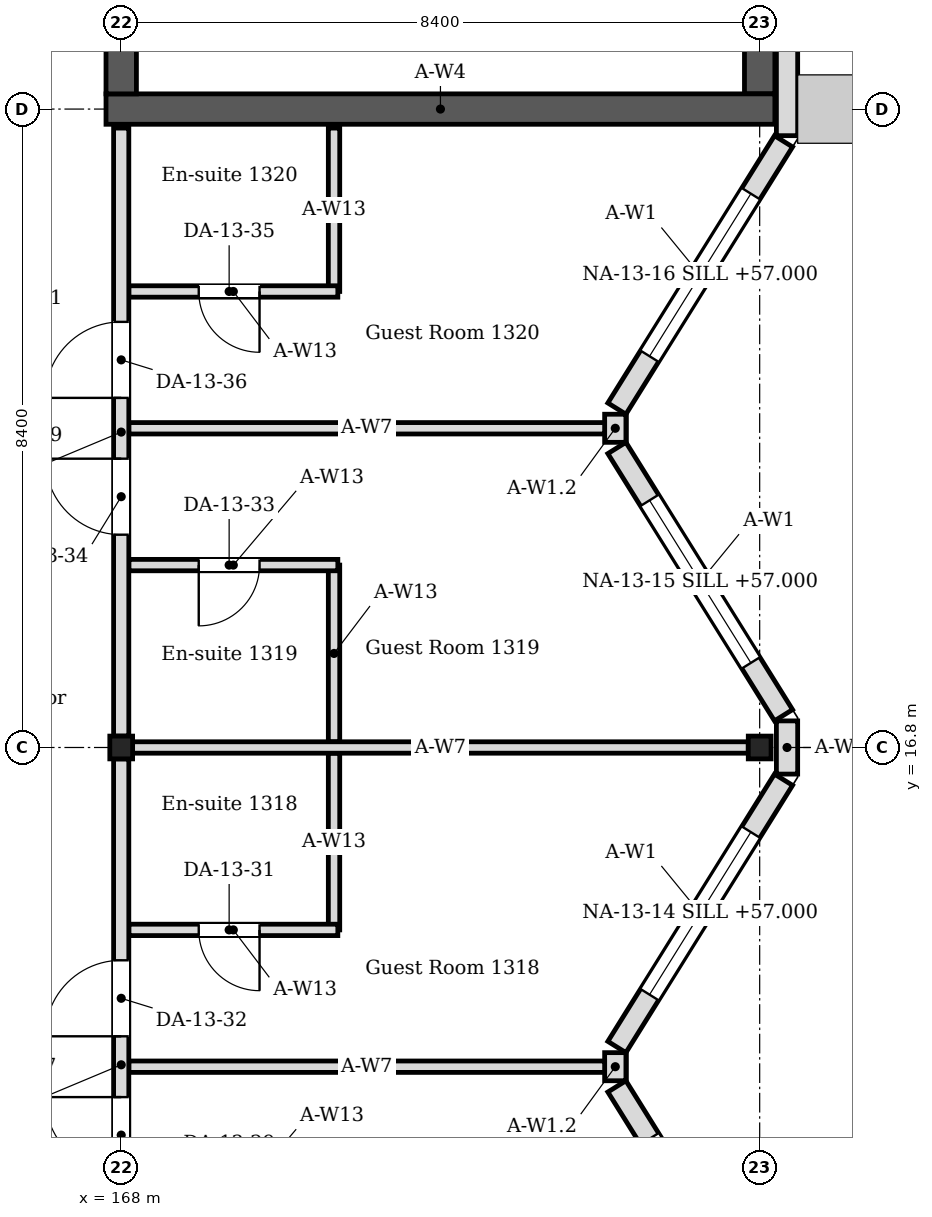
"""IFC4 building model, lengths in metres.
Left out: names, types, materials, properties, quantities, classifications, styles, units other than length and angle.
Written with IfcOpenShell. Run it as: python <this file> out.ifc"""

import sys

from ifc_helpers import new_model, si_unit, direction, frame, frame_2d, origin, origin_2d, place, context, subcontext, project, spatial, rectangle, i_section, extrude, element, fill, save


model = new_model("IFC4")
c1 = context("Model", 3, precision=1e-05, world=origin(), true_north=direction((0.0, 1.0)))
c2 = subcontext(c1, "Body", "Model", "MODEL_VIEW")
j1 = project(units=[si_unit("LENGTHUNIT", "METRE"), si_unit("PLANEANGLEUNIT", "RADIAN")], contexts=[c1])
p1 = place(None, origin())
s1 = spatial("IfcSite", under=j1, at=p1, CompositionType="ELEMENT")
p2 = place(p1, origin())
s2 = spatial("IfcBuilding", under=s1, at=p2, CompositionType="ELEMENT")
p3 = place(p2, frame((0.0, 0.0, 56.4)))
s3 = spatial("IfcBuildingStorey", under=s2, at=p3, CompositionType="ELEMENT", Elevation=56.4)
for number, where, z_axis, x_axis in (
    (1, (168.0, 16.8, 0.0), (0.0, 0.0, 1.0), (1.0, 0.0, 0.0)),
    (2, (176.4, 16.8, 0.0), (0.0, 0.0, 1.0), (1.0, 0.0, 0.0)),
):
    element("IfcColumn", number, at=place(p3, frame(where, z_axis=z_axis, x_axis=x_axis)), inside=s3, PredefinedType="COLUMN", context=c2, shape_type="SweptSolid", body=[
        extrude(i_section(OverallWidth=0.3, OverallDepth=0.3, WebThickness=0.01, FlangeThickness=0.015, FilletRadius=0.013, at=origin_2d()), origin(), (0.0, 0.0, 1.0), 4.2),
    ])
p4 = place(p3, frame((167.8, 25.2, 0.0), z_axis=(0.0, 0.0, 1.0), x_axis=(1.0, 0.0, 0.0)))
e3 = element("IfcWall", 3, at=p4, inside=s3, PredefinedType="SOLIDWALL", context=c2, shape_type="SweptSolid", body=[
    extrude(rectangle(XDim=8.8, YDim=0.4, at=frame_2d((4.4, 0.0))), origin(), (0.0, 0.0, 1.0), 4.05),
])
p5 = place(p3, frame((168.0, 25.4, 0.0), z_axis=(0.0, 0.0, 1.0), x_axis=(0.0, 1.0, 0.0)))
e4 = element("IfcWall", 4, at=p5, inside=s3, PredefinedType="SOLIDWALL", context=c2, shape_type="SweptSolid", body=[
    extrude(rectangle(XDim=16.4, YDim=0.4, at=frame_2d((8.2, 0.0))), origin(), (0.0, 0.0, 1.0), 4.05),
])
p6 = place(p5, frame((1.0, 0.0, 0.0)))
e5 = element("IfcOpeningElement", 5, at=p6, cuts=e4, PredefinedType="OPENING", context=c2, shape_type="SweptSolid", body=[
    extrude(rectangle(XDim=1.0, YDim=2.1, at=frame_2d((0.5, 1.05))), frame((0.0, 0.21, 0.0), z_axis=(0.0, -1.0, 0.0), x_axis=(1.0, 0.0, 0.0)), (0.0, 0.0, 1.0), 0.42),
])
p7 = place(p5, frame((14.4, 0.0, 0.0)))
e6 = element("IfcOpeningElement", 6, at=p7, cuts=e4, PredefinedType="OPENING", context=c2, shape_type="SweptSolid", body=[
    extrude(rectangle(XDim=1.4, YDim=2.1, at=frame_2d((0.7, 1.05))), frame((0.0, 0.21, 0.0), z_axis=(0.0, -1.0, 0.0), x_axis=(1.0, 0.0, 0.0)), (0.0, 0.0, 1.0), 0.42),
])
p8 = place(p3, frame((176.4, 25.4, 0.0), z_axis=(0.0, 0.0, 1.0), x_axis=(0.0, 1.0, 0.0)))
e7 = element("IfcWall", 7, at=p8, inside=s3, PredefinedType="SOLIDWALL", context=c2, shape_type="SweptSolid", body=[
    extrude(rectangle(XDim=16.4, YDim=0.4, at=frame_2d((8.2, 0.0))), origin(), (0.0, 0.0, 1.0), 4.05),
])
p9 = place(p3, frame((176.714, 8.824, 0.0), z_axis=(0.0, 0.0, 1.0), x_axis=(-0.529018946142, 0.848610013271, 0.0)))
e8 = element("IfcWall", 8, at=p9, inside=s3, PredefinedType="SOLIDWALL", context=c2, shape_type="SweptSolid", body=[
    extrude(rectangle(XDim=4.144, YDim=0.28, at=frame_2d((2.072, 0.0))), origin(), (0.0, 0.0, 1.0), 4.05),
])
p10 = place(p9, frame((0.812, 0.0, 0.6)))
e9 = element("IfcOpeningElement", 9, at=p10, cuts=e8, PredefinedType="OPENING", context=c2, shape_type="SweptSolid", body=[
    extrude(rectangle(XDim=2.52, YDim=2.4, at=frame_2d((1.26, 1.2))), frame((0.0, 0.15, 0.0), z_axis=(0.0, -1.0, 0.0), x_axis=(1.0, 0.0, 0.0)), (0.0, 0.0, 1.0), 0.3),
])
p11 = place(p3, frame((174.521, 12.859, 0.0), z_axis=(0.0, 0.0, 1.0), x_axis=(0.528992500338, 0.848626498871, 0.0)))
e10 = element("IfcWall", 10, at=p11, inside=s3, PredefinedType="SOLIDWALL", context=c2, shape_type="SweptSolid", body=[
    extrude(rectangle(XDim=4.145, YDim=0.28, at=frame_2d((2.072, 0.0))), origin(), (0.0, 0.0, 1.0), 4.05),
])
p12 = place(p11, frame((0.812, 0.0, 0.6)))
e11 = element("IfcOpeningElement", 11, at=p12, cuts=e10, PredefinedType="OPENING", context=c2, shape_type="SweptSolid", body=[
    extrude(rectangle(XDim=2.52, YDim=2.4, at=frame_2d((1.26, 1.2))), frame((0.0, 0.15, 0.0), z_axis=(0.0, -1.0, 0.0), x_axis=(1.0, 0.0, 0.0)), (0.0, 0.0, 1.0), 0.3),
])
p13 = place(p3, frame((174.5, 12.415, 0.0), z_axis=(0.0, 0.0, 1.0), x_axis=(0.0, 1.0, 0.0)))
e12 = element("IfcWall", 12, at=p13, inside=s3, PredefinedType="SOLIDWALL", context=c2, shape_type="SweptSolid", body=[
    extrude(rectangle(XDim=0.37, YDim=0.28, at=frame_2d((0.185, 0.0))), origin(), (0.0, 0.0, 1.0), 3.604),
])
p14 = place(p3, frame((176.76, 16.45, 0.0), z_axis=(0.0, 0.0, 1.0), x_axis=(0.0, 1.0, 0.0)))
e13 = element("IfcWall", 13, at=p14, inside=s3, PredefinedType="SOLIDWALL", context=c2, shape_type="SweptSolid", body=[
    extrude(rectangle(XDim=0.7, YDim=0.28, at=frame_2d((0.35, 0.0))), origin(), (0.0, 0.0, 1.0), 4.05),
])
p15 = place(p3, frame((176.714, 17.224, 0.0), z_axis=(0.0, 0.0, 1.0), x_axis=(-0.529018946142, 0.848610013271, 0.0)))
e14 = element("IfcWall", 14, at=p15, inside=s3, PredefinedType="SOLIDWALL", context=c2, shape_type="SweptSolid", body=[
    extrude(rectangle(XDim=4.144, YDim=0.28, at=frame_2d((2.072, 0.0))), origin(), (0.0, 0.0, 1.0), 4.05),
])
p16 = place(p15, frame((0.812, 0.0, 0.6)))
e15 = element("IfcOpeningElement", 15, at=p16, cuts=e14, PredefinedType="OPENING", context=c2, shape_type="SweptSolid", body=[
    extrude(rectangle(XDim=2.52, YDim=2.4, at=frame_2d((1.26, 1.2))), frame((0.0, 0.15, 0.0), z_axis=(0.0, -1.0, 0.0), x_axis=(1.0, 0.0, 0.0)), (0.0, 0.0, 1.0), 0.3),
])
p17 = place(p3, frame((174.521, 21.259, 0.0), z_axis=(0.0, 0.0, 1.0), x_axis=(0.529018946142, 0.848610013271, 0.0)))
e16 = element("IfcWall", 16, at=p17, inside=s3, PredefinedType="SOLIDWALL", context=c2, shape_type="SweptSolid", body=[
    extrude(rectangle(XDim=4.144, YDim=0.28, at=frame_2d((2.072, 0.0))), origin(), (0.0, 0.0, 1.0), 4.05),
])
p18 = place(p17, frame((0.812, 0.0, 0.6)))
e17 = element("IfcOpeningElement", 17, at=p18, cuts=e16, PredefinedType="OPENING", context=c2, shape_type="SweptSolid", body=[
    extrude(rectangle(XDim=2.52, YDim=2.4, at=frame_2d((1.26, 1.2))), frame((0.0, 0.15, 0.0), z_axis=(0.0, -1.0, 0.0), x_axis=(1.0, 0.0, 0.0)), (0.0, 0.0, 1.0), 0.3),
])
p19 = place(p3, frame((174.5, 20.815, 0.0), z_axis=(0.0, 0.0, 1.0), x_axis=(0.0, 1.0, 0.0)))
e18 = element("IfcWall", 18, at=p19, inside=s3, PredefinedType="SOLIDWALL", context=c2, shape_type="SweptSolid", body=[
    extrude(rectangle(XDim=0.37, YDim=0.28, at=frame_2d((0.185, 0.0))), origin(), (0.0, 0.0, 1.0), 3.604),
])
p20 = place(p3, frame((176.76, 24.85, 0.0), z_axis=(0.0, 0.0, 1.0), x_axis=(0.0, 1.0, 0.0)))
e19 = element("IfcWall", 19, at=p20, inside=s3, PredefinedType="SOLIDWALL", context=c2, shape_type="SweptSolid", body=[
    extrude(rectangle(XDim=42.57, YDim=0.28, at=frame_2d((21.285, 0.0))), origin(), (0.0, 0.0, 1.0), 4.05),
])
p21 = place(p20, frame((18.83, 0.0, 0.6)))
e20 = element("IfcOpeningElement", 20, at=p21, cuts=e19, PredefinedType="OPENING", context=c2, shape_type="SweptSolid", body=[
    extrude(rectangle(XDim=5.04, YDim=2.4, at=frame_2d((2.52, 1.2))), frame((0.0, 0.15, 0.0), z_axis=(0.0, -1.0, 0.0), x_axis=(1.0, 0.0, 0.0)), (0.0, 0.0, 1.0), 0.3),
])
p22 = place(p20, frame((27.23, 0.0, 0.6)))
e21 = element("IfcOpeningElement", 21, at=p22, cuts=e19, PredefinedType="OPENING", context=c2, shape_type="SweptSolid", body=[
    extrude(rectangle(XDim=5.04, YDim=2.4, at=frame_2d((2.52, 1.2))), frame((0.0, 0.15, 0.0), z_axis=(0.0, -1.0, 0.0), x_axis=(1.0, 0.0, 0.0)), (0.0, 0.0, 1.0), 0.3),
])
p23 = place(p3, frame((170.8, 14.4, 0.0), z_axis=(0.0, 0.0, 1.0), x_axis=(0.0, 1.0, 0.0)))
e22 = element("IfcWall", 22, at=p23, inside=s3, PredefinedType="PARTITIONING", context=c2, shape_type="SweptSolid", body=[
    extrude(rectangle(XDim=2.325, YDim=0.15, at=frame_2d((1.163, 0.0))), origin(), (0.0, 0.0, 1.0), 4.05),
])
p24 = place(p3, frame((170.85, 14.4, 0.0), z_axis=(0.0, 0.0, 1.0), x_axis=(-1.0, 0.0, 0.0)))
e23 = element("IfcWall", 23, at=p24, inside=s3, PredefinedType="PARTITIONING", context=c2, shape_type="SweptSolid", body=[
    extrude(rectangle(XDim=2.75, YDim=0.15, at=frame_2d((1.375, 0.0))), origin(), (0.0, 0.0, 1.0), 4.05),
])
p25 = place(p24, frame((1.03, 0.0, 0.0)))
e24 = element("IfcOpeningElement", 24, at=p25, cuts=e23, PredefinedType="OPENING", context=c2, shape_type="SweptSolid", body=[
    extrude(rectangle(XDim=0.8, YDim=2.1, at=frame_2d((0.4, 1.05))), frame((0.0, 0.085, 0.0), z_axis=(0.0, -1.0, 0.0), x_axis=(1.0, 0.0, 0.0)), (0.0, 0.0, 1.0), 0.17),
])
p26 = place(p3, frame((170.8, 16.875, 0.0), z_axis=(0.0, 0.0, 1.0), x_axis=(0.0, 1.0, 0.0)))
e25 = element("IfcWall", 25, at=p26, inside=s3, PredefinedType="PARTITIONING", context=c2, shape_type="SweptSolid", body=[
    extrude(rectangle(XDim=2.325, YDim=0.15, at=frame_2d((1.163, 0.0))), origin(), (0.0, 0.0, 1.0), 4.05),
])
p27 = place(p3, frame((170.85, 19.2, 0.0), z_axis=(0.0, 0.0, 1.0), x_axis=(-1.0, 0.0, 0.0)))
e26 = element("IfcWall", 26, at=p27, inside=s3, PredefinedType="PARTITIONING", context=c2, shape_type="SweptSolid", body=[
    extrude(rectangle(XDim=2.75, YDim=0.15, at=frame_2d((1.375, 0.0))), origin(), (0.0, 0.0, 1.0), 4.05),
])
p28 = place(p27, frame((1.03, 0.0, 0.0)))
e27 = element("IfcOpeningElement", 27, at=p28, cuts=e26, PredefinedType="OPENING", context=c2, shape_type="SweptSolid", body=[
    extrude(rectangle(XDim=0.8, YDim=2.1, at=frame_2d((0.4, 1.05))), frame((0.0, 0.085, 0.0), z_axis=(0.0, -1.0, 0.0), x_axis=(1.0, 0.0, 0.0)), (0.0, 0.0, 1.0), 0.17),
])
p29 = place(p3, frame((170.8, 22.8, 0.0), z_axis=(0.0, 0.0, 1.0), x_axis=(0.0, 1.0, 0.0)))
e28 = element("IfcWall", 28, at=p29, inside=s3, PredefinedType="PARTITIONING", context=c2, shape_type="SweptSolid", body=[
    extrude(rectangle(XDim=2.15, YDim=0.15, at=frame_2d((1.075, 0.0))), origin(), (0.0, 0.0, 1.0), 4.05),
])
p30 = place(p3, frame((170.85, 22.8, 0.0), z_axis=(0.0, 0.0, 1.0), x_axis=(-1.0, 0.0, 0.0)))
e29 = element("IfcWall", 29, at=p30, inside=s3, PredefinedType="PARTITIONING", context=c2, shape_type="SweptSolid", body=[
    extrude(rectangle(XDim=2.75, YDim=0.15, at=frame_2d((1.375, 0.0))), origin(), (0.0, 0.0, 1.0), 4.05),
])
p31 = place(p30, frame((1.03, 0.0, 0.0)))
e30 = element("IfcOpeningElement", 30, at=p31, cuts=e29, PredefinedType="OPENING", context=c2, shape_type="SweptSolid", body=[
    extrude(rectangle(XDim=0.8, YDim=2.1, at=frame_2d((0.4, 1.05))), frame((0.0, 0.085, 0.0), z_axis=(0.0, -1.0, 0.0), x_axis=(1.0, 0.0, 0.0)), (0.0, 0.0, 1.0), 0.17),
])
p32 = place(p3, frame((168.15, 16.8, 0.0), z_axis=(0.0, 0.0, 1.0), x_axis=(1.0, 0.0, 0.0)))
e31 = element("IfcWall", 31, at=p32, inside=s3, PredefinedType="PARTITIONING", context=c2, shape_type="SweptSolid", body=[
    extrude(rectangle(XDim=8.1, YDim=0.15, at=frame_2d((4.05, 0.0))), origin(), (0.0, 0.0, 1.0), 3.604),
])
for number, where, z_axis, x_axis in (
    (32, (168.1, 12.6, 0.0), (0.0, 0.0, 1.0), (1.0, 0.0, 0.0)),
    (33, (168.1, 21.0, 0.0), (0.0, 0.0, 1.0), (1.0, 0.0, 0.0)),
):
    element("IfcWall", number, at=place(p3, frame(where, z_axis=z_axis, x_axis=x_axis)), inside=s3, PredefinedType="PARTITIONING", context=c2, shape_type="SweptSolid", body=[
        extrude(rectangle(XDim=6.26, YDim=0.15, at=frame_2d((3.13, 0.0))), origin(), (0.0, 0.0, 1.0), 3.604),
    ])
p33 = place(p3, frame((168.0, 8.6, 0.0), z_axis=(0.0, 0.0, 1.0), x_axis=(0.0, 1.0, 0.0)))
e34 = element("IfcWall", 34, at=p33, inside=s3, PredefinedType="PARTITIONING", context=c2, shape_type="SweptSolid", body=[
    extrude(rectangle(XDim=8.05, YDim=0.2, at=frame_2d((4.025, 0.0))), origin(), (0.0, 0.0, 1.0), 3.45),
])
p34 = place(p33, frame((2.6, 0.0, 0.0)))
e35 = element("IfcOpeningElement", 35, at=p34, cuts=e34, PredefinedType="OPENING", context=c2, shape_type="SweptSolid", body=[
    extrude(rectangle(XDim=1.0, YDim=2.4, at=frame_2d((0.5, 1.2))), frame((0.0, 0.11, 0.0), z_axis=(0.0, -1.0, 0.0), x_axis=(1.0, 0.0, 0.0)), (0.0, 0.0, 1.0), 0.22),
])
p35 = place(p33, frame((4.4, 0.0, 0.0)))
e36 = element("IfcOpeningElement", 36, at=p35, cuts=e34, PredefinedType="OPENING", context=c2, shape_type="SweptSolid", body=[
    extrude(rectangle(XDim=1.0, YDim=2.4, at=frame_2d((0.5, 1.2))), frame((0.0, 0.11, 0.0), z_axis=(0.0, -1.0, 0.0), x_axis=(1.0, 0.0, 0.0)), (0.0, 0.0, 1.0), 0.22),
])
p36 = place(p3, frame((168.0, 16.95, 0.0), z_axis=(0.0, 0.0, 1.0), x_axis=(0.0, 1.0, 0.0)))
e37 = element("IfcWall", 37, at=p36, inside=s3, PredefinedType="PARTITIONING", context=c2, shape_type="SweptSolid", body=[
    extrude(rectangle(XDim=8.0, YDim=0.2, at=frame_2d((4.0, 0.0))), origin(), (0.0, 0.0, 1.0), 3.45),
])
p37 = place(p36, frame((2.65, 0.0, 0.0)))
e38 = element("IfcOpeningElement", 38, at=p37, cuts=e37, PredefinedType="OPENING", context=c2, shape_type="SweptSolid", body=[
    extrude(rectangle(XDim=1.0, YDim=2.4, at=frame_2d((0.5, 1.2))), frame((0.0, 0.11, 0.0), z_axis=(0.0, -1.0, 0.0), x_axis=(1.0, 0.0, 0.0)), (0.0, 0.0, 1.0), 0.22),
])
p38 = place(p36, frame((4.45, 0.0, 0.0)))
e39 = element("IfcOpeningElement", 39, at=p38, cuts=e37, PredefinedType="OPENING", context=c2, shape_type="SweptSolid", body=[
    extrude(rectangle(XDim=1.0, YDim=2.4, at=frame_2d((0.5, 1.2))), frame((0.0, 0.11, 0.0), z_axis=(0.0, -1.0, 0.0), x_axis=(1.0, 0.0, 0.0)), (0.0, 0.0, 1.0), 0.22),
])
p39 = place(p12, origin())
e40 = element("IfcWindow", 40, at=p39, inside=s3, PartitioningType="SINGLE_PANEL", PredefinedType="WINDOW", context=c2, shape_type="SweptSolid", body=[
    extrude(rectangle(XDim=2.52, YDim=2.4, at=frame_2d((1.26, 1.2))), frame((0.0, 0.03, 0.0), z_axis=(0.0, -1.0, 0.0), x_axis=(1.0, 0.0, 0.0)), (0.0, 0.0, 1.0), 0.06),
])
fill(e11, e40)
p40 = place(p16, origin())
e41 = element("IfcWindow", 41, at=p40, inside=s3, PartitioningType="SINGLE_PANEL", PredefinedType="WINDOW", context=c2, shape_type="SweptSolid", body=[
    extrude(rectangle(XDim=2.52, YDim=2.4, at=frame_2d((1.26, 1.2))), frame((0.0, 0.03, 0.0), z_axis=(0.0, -1.0, 0.0), x_axis=(1.0, 0.0, 0.0)), (0.0, 0.0, 1.0), 0.06),
])
fill(e15, e41)
p41 = place(p18, origin())
e42 = element("IfcWindow", 42, at=p41, inside=s3, PartitioningType="SINGLE_PANEL", PredefinedType="WINDOW", context=c2, shape_type="SweptSolid", body=[
    extrude(rectangle(XDim=2.52, YDim=2.4, at=frame_2d((1.26, 1.2))), frame((0.0, 0.03, 0.0), z_axis=(0.0, -1.0, 0.0), x_axis=(1.0, 0.0, 0.0)), (0.0, 0.0, 1.0), 0.06),
])
fill(e17, e42)
p42 = place(p34, origin())
e43 = element("IfcDoor", 43, at=p42, inside=s3, OperationType="SINGLE_SWING_RIGHT", PredefinedType="DOOR", context=c2, shape_type="SweptSolid", body=[
    extrude(rectangle(XDim=1.0, YDim=2.4, at=frame_2d((0.5, 1.2))), frame((0.0, 0.025, 0.0), z_axis=(0.0, -1.0, 0.0), x_axis=(1.0, 0.0, 0.0)), (0.0, 0.0, 1.0), 0.05),
])
fill(e35, e43)
p43 = place(p25, origin())
e44 = element("IfcDoor", 44, at=p43, inside=s3, OperationType="SINGLE_SWING_LEFT", PredefinedType="DOOR", context=c2, shape_type="SweptSolid", body=[
    extrude(rectangle(XDim=0.8, YDim=2.1, at=frame_2d((0.4, 1.05))), frame((0.0, 0.025, 0.0), z_axis=(0.0, -1.0, 0.0), x_axis=(1.0, 0.0, 0.0)), (0.0, 0.0, 1.0), 0.05),
])
fill(e24, e44)
p44 = place(p35, origin())
e45 = element("IfcDoor", 45, at=p44, inside=s3, OperationType="SINGLE_SWING_LEFT", PredefinedType="DOOR", context=c2, shape_type="SweptSolid", body=[
    extrude(rectangle(XDim=1.0, YDim=2.4, at=frame_2d((0.5, 1.2))), frame((0.0, 0.025, 0.0), z_axis=(0.0, -1.0, 0.0), x_axis=(1.0, 0.0, 0.0)), (0.0, 0.0, 1.0), 0.05),
])
fill(e36, e45)
p45 = place(p28, origin())
e46 = element("IfcDoor", 46, at=p45, inside=s3, OperationType="SINGLE_SWING_RIGHT", PredefinedType="DOOR", context=c2, shape_type="SweptSolid", body=[
    extrude(rectangle(XDim=0.8, YDim=2.1, at=frame_2d((0.4, 1.05))), frame((0.0, 0.025, 0.0), z_axis=(0.0, -1.0, 0.0), x_axis=(1.0, 0.0, 0.0)), (0.0, 0.0, 1.0), 0.05),
])
fill(e27, e46)
p46 = place(p37, origin())
e47 = element("IfcDoor", 47, at=p46, inside=s3, OperationType="SINGLE_SWING_RIGHT", PredefinedType="DOOR", context=c2, shape_type="SweptSolid", body=[
    extrude(rectangle(XDim=1.0, YDim=2.4, at=frame_2d((0.5, 1.2))), frame((0.0, 0.025, 0.0), z_axis=(0.0, -1.0, 0.0), x_axis=(1.0, 0.0, 0.0)), (0.0, 0.0, 1.0), 0.05),
])
fill(e38, e47)
p47 = place(p31, origin())
e48 = element("IfcDoor", 48, at=p47, inside=s3, OperationType="SINGLE_SWING_LEFT", PredefinedType="DOOR", context=c2, shape_type="SweptSolid", body=[
    extrude(rectangle(XDim=0.8, YDim=2.1, at=frame_2d((0.4, 1.05))), frame((0.0, 0.025, 0.0), z_axis=(0.0, -1.0, 0.0), x_axis=(1.0, 0.0, 0.0)), (0.0, 0.0, 1.0), 0.05),
])
fill(e30, e48)
p48 = place(p38, origin())
e49 = element("IfcDoor", 49, at=p48, inside=s3, OperationType="SINGLE_SWING_LEFT", PredefinedType="DOOR", context=c2, shape_type="SweptSolid", body=[
    extrude(rectangle(XDim=1.0, YDim=2.4, at=frame_2d((0.5, 1.2))), frame((0.0, 0.025, 0.0), z_axis=(0.0, -1.0, 0.0), x_axis=(1.0, 0.0, 0.0)), (0.0, 0.0, 1.0), 0.05),
])
fill(e39, e49)
save(model, sys.argv[1])
